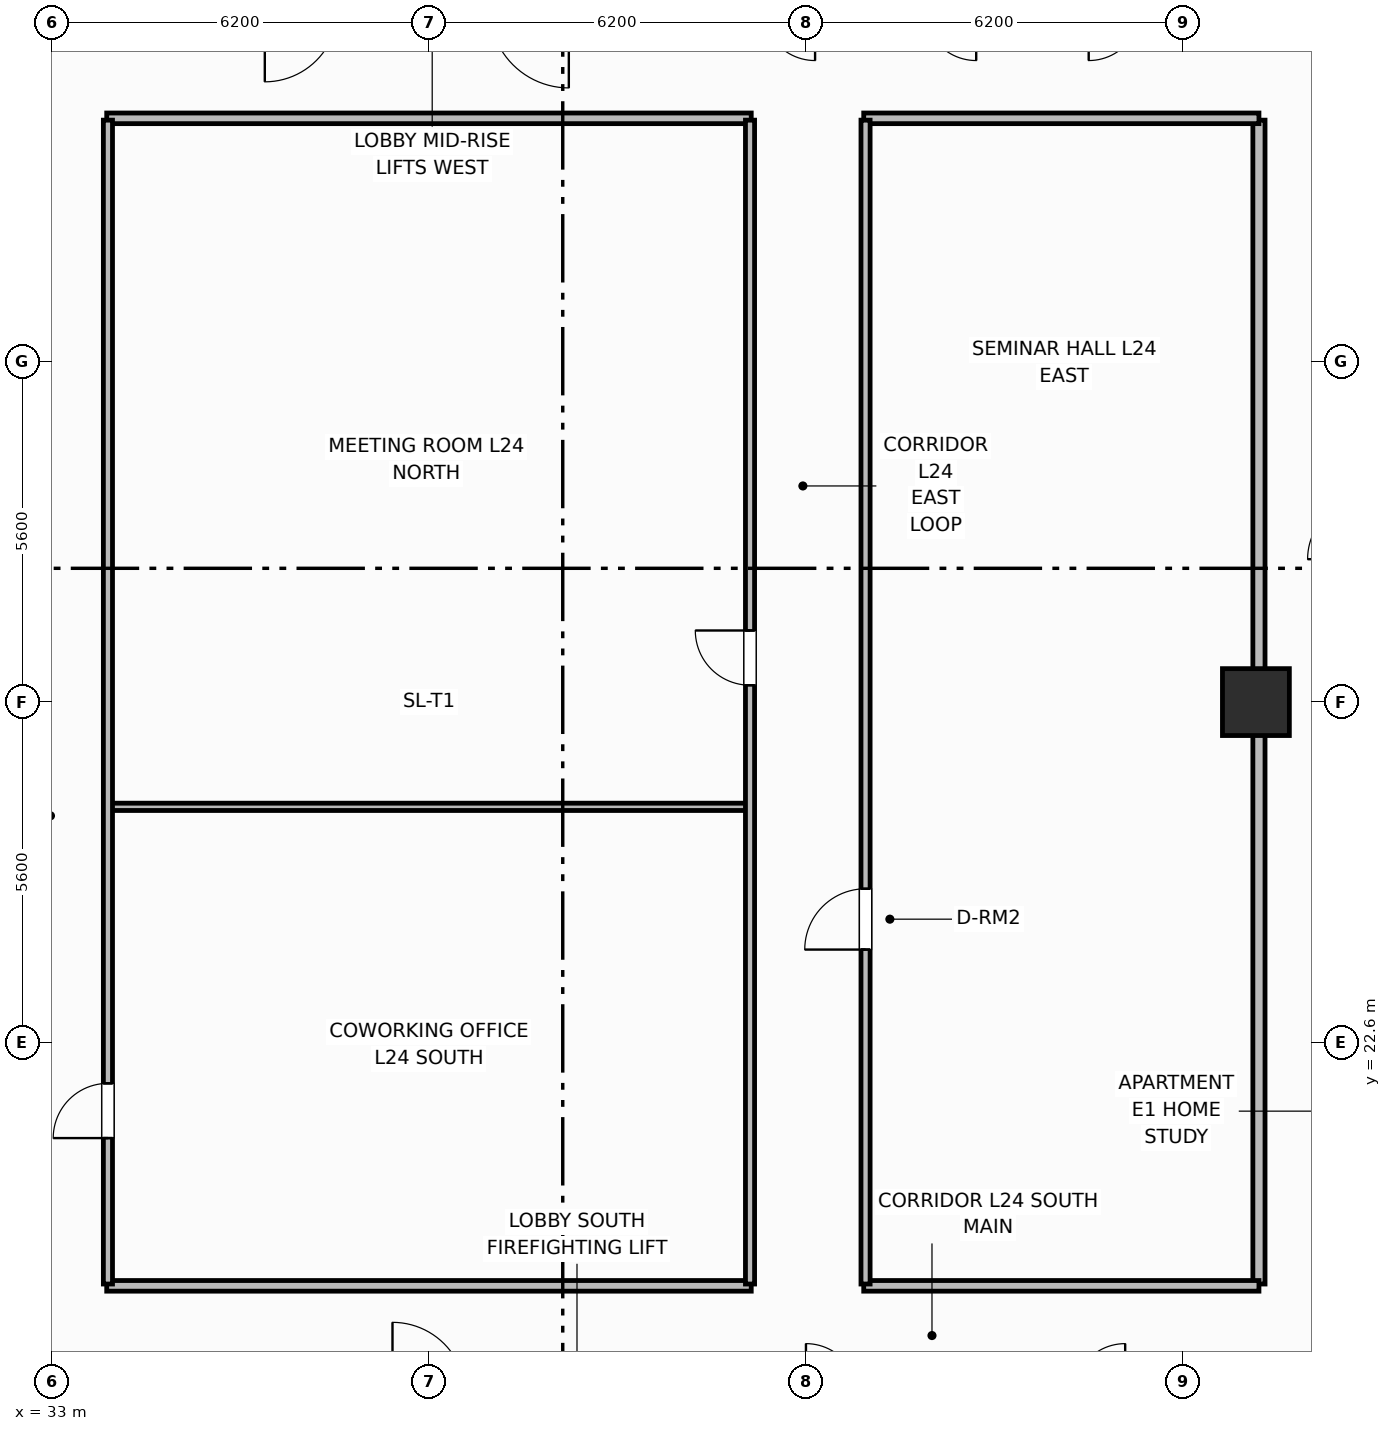
"""IFC4 building model, lengths in metres.
Left out: names, types, materials, properties, quantities, classifications, styles, units other than length and angle.
Written with IfcOpenShell. Run it as: python <this file> out.ifc"""

import sys

from ifc_helpers import new_model, si_unit, direction, frame, frame_2d, origin, origin_2d, place, context, subcontext, project, spatial, rectangle, extrude, element, fill, save


model = new_model("IFC4")
c1 = context("Model", 3, precision=1e-05, world=origin(), true_north=direction((0.0, 1.0)))
c2 = subcontext(c1, "Body", "Model", "MODEL_VIEW")
j1 = project(units=[si_unit("LENGTHUNIT", "METRE"), si_unit("PLANEANGLEUNIT", "RADIAN")], contexts=[c1])
p1 = place(None, origin())
s1 = spatial("IfcSite", under=j1, at=p1, CompositionType="ELEMENT")
p2 = place(p1, origin())
s2 = spatial("IfcBuilding", under=s1, at=p2, CompositionType="ELEMENT")
p3 = place(p2, frame((0.0, 0.0, 99.4)))
s3 = spatial("IfcBuildingStorey", under=s2, at=p3, CompositionType="ELEMENT", Elevation=99.4)
p4 = place(p3, frame((52.8, 28.2, 0.0), z_axis=(0.0, 0.0, 1.0), x_axis=(1.0, 0.0, 0.0)))
e1 = element("IfcColumn", 1, at=p4, inside=s3, PredefinedType="COLUMN", context=c2, shape_type="SweptSolid", body=[
    extrude(rectangle(XDim=1.1, YDim=1.1, at=origin_2d()), origin(), (0.0, 0.0, 1.0), 3.7),
])
p5 = place(p3, frame((52.85, 18.63, 0.0), z_axis=(0.0, 0.0, 1.0), x_axis=(0.0, 1.0, 0.0)))
e2 = element("IfcWall", 2, at=p5, inside=s3, PredefinedType="PARTITIONING", context=c2, shape_type="SweptSolid", body=[
    extrude(rectangle(XDim=19.14, YDim=0.2, at=frame_2d((9.57, 0.0))), origin(), (0.0, 0.0, 1.0), 2.53),
])
for number, where, z_axis, x_axis in (
    (3, (33.9, 18.6, 0.0), (0.0, 0.0, 1.0), (1.0, 0.0, 0.0)),
    (4, (33.9, 37.8, 0.0), (0.0, 0.0, 1.0), (1.0, 0.0, 0.0)),
):
    element("IfcWall", number, at=place(p3, frame(where, z_axis=z_axis, x_axis=x_axis)), inside=s3, PredefinedType="PARTITIONING", context=c2, shape_type="SweptSolid", body=[
        extrude(rectangle(XDim=10.6, YDim=0.175, at=frame_2d((5.3, 0.0))), origin(), (0.0, 0.0, 1.0), 2.53),
    ])
for number, where, z_axis, x_axis in (
    (5, (46.35, 18.6, 0.0), (0.0, 0.0, 1.0), (1.0, 0.0, 0.0)),
    (6, (46.35, 37.8, 0.0), (0.0, 0.0, 1.0), (1.0, 0.0, 0.0)),
):
    element("IfcWall", number, at=place(p3, frame(where, z_axis=z_axis, x_axis=x_axis)), inside=s3, PredefinedType="PARTITIONING", context=c2, shape_type="SweptSolid", body=[
        extrude(rectangle(XDim=6.5, YDim=0.175, at=frame_2d((3.25, 0.0))), origin(), (0.0, 0.0, 1.0), 2.53),
    ])
p6 = place(p3, frame((33.92, 26.477, 0.0), z_axis=(0.0, 0.0, 1.0), x_axis=(1.0, 0.0, 0.0)))
e7 = element("IfcWall", 7, at=p6, inside=s3, PredefinedType="PARTITIONING", context=c2, shape_type="SweptSolid", body=[
    extrude(rectangle(XDim=10.56, YDim=0.12, at=frame_2d((5.28, 0.0))), origin(), (0.0, 0.0, 1.0), 2.53),
])
p7 = place(p3, frame((33.92, 18.63, 0.0), z_axis=(0.0, 0.0, 1.0), x_axis=(0.0, 1.0, 0.0)))
e8 = element("IfcWall", 8, at=p7, inside=s3, PredefinedType="PARTITIONING", context=c2, shape_type="SweptSolid", body=[
    extrude(rectangle(XDim=19.14, YDim=0.15, at=frame_2d((9.57, 0.0))), origin(), (0.0, 0.0, 1.0), 2.53),
])
p8 = place(p7, frame((2.4, 0.0, 0.0)))
e9 = element("IfcOpeningElement", 9, at=p8, cuts=e8, PredefinedType="OPENING", context=c2, shape_type="SweptSolid", body=[
    extrude(rectangle(XDim=0.9, YDim=2.1, at=frame_2d((0.45, 1.05))), frame((0.0, 0.085, 0.0), z_axis=(0.0, -1.0, 0.0), x_axis=(1.0, 0.0, 0.0)), (0.0, 0.0, 1.0), 0.17),
])
p9 = place(p3, frame((44.48, 18.63, 0.0), z_axis=(0.0, 0.0, 1.0), x_axis=(0.0, 1.0, 0.0)))
e10 = element("IfcWall", 10, at=p9, inside=s3, PredefinedType="PARTITIONING", context=c2, shape_type="SweptSolid", body=[
    extrude(rectangle(XDim=19.14, YDim=0.15, at=frame_2d((9.57, 0.0))), origin(), (0.0, 0.0, 1.0), 2.53),
])
p10 = place(p9, frame((9.847, 0.0, 0.0)))
e11 = element("IfcOpeningElement", 11, at=p10, cuts=e10, PredefinedType="OPENING", context=c2, shape_type="SweptSolid", body=[
    extrude(rectangle(XDim=0.9, YDim=2.1, at=frame_2d((0.45, 1.05))), frame((0.0, 0.085, 0.0), z_axis=(0.0, -1.0, 0.0), x_axis=(1.0, 0.0, 0.0)), (0.0, 0.0, 1.0), 0.17),
])
p11 = place(p3, frame((46.38, 18.63, 0.0), z_axis=(0.0, 0.0, 1.0), x_axis=(0.0, 1.0, 0.0)))
e12 = element("IfcWall", 12, at=p11, inside=s3, PredefinedType="PARTITIONING", context=c2, shape_type="SweptSolid", body=[
    extrude(rectangle(XDim=19.14, YDim=0.15, at=frame_2d((9.57, 0.0))), origin(), (0.0, 0.0, 1.0), 2.53),
])
p12 = place(p11, frame((5.5, 0.0, 0.0)))
e13 = element("IfcOpeningElement", 13, at=p12, cuts=e12, PredefinedType="OPENING", context=c2, shape_type="SweptSolid", body=[
    extrude(rectangle(XDim=1.0, YDim=2.15, at=frame_2d((0.5, 1.075))), frame((0.0, 0.085, 0.0), z_axis=(0.0, -1.0, 0.0), x_axis=(1.0, 0.0, 0.0)), (0.0, 0.0, 1.0), 0.17),
])
p13 = place(p8, origin())
e14 = element("IfcDoor", 14, at=p13, inside=s3, OperationType="SINGLE_SWING_LEFT", PredefinedType="DOOR", context=c2, shape_type="SweptSolid", body=[
    extrude(rectangle(XDim=0.9, YDim=2.1, at=frame_2d((0.45, 1.05))), frame((0.0, 0.025, 0.0), z_axis=(0.0, -1.0, 0.0), x_axis=(1.0, 0.0, 0.0)), (0.0, 0.0, 1.0), 0.05),
])
fill(e9, e14)
p14 = place(p10, origin())
e15 = element("IfcDoor", 15, at=p14, inside=s3, OperationType="SINGLE_SWING_RIGHT", PredefinedType="DOOR", context=c2, shape_type="SweptSolid", body=[
    extrude(rectangle(XDim=0.9, YDim=2.1, at=frame_2d((0.45, 1.05))), frame((0.0, 0.025, 0.0), z_axis=(0.0, -1.0, 0.0), x_axis=(1.0, 0.0, 0.0)), (0.0, 0.0, 1.0), 0.05),
])
fill(e11, e15)
p15 = place(p12, origin())
e16 = element("IfcDoor", 16, at=p15, inside=s3, OperationType="SINGLE_SWING_LEFT", PredefinedType="DOOR", context=c2, shape_type="SweptSolid", body=[
    extrude(rectangle(XDim=1.0, YDim=2.15, at=frame_2d((0.5, 1.075))), frame((0.0, 0.025, 0.0), z_axis=(0.0, -1.0, 0.0), x_axis=(1.0, 0.0, 0.0)), (0.0, 0.0, 1.0), 0.05),
])
fill(e13, e16)
save(model, sys.argv[1])
